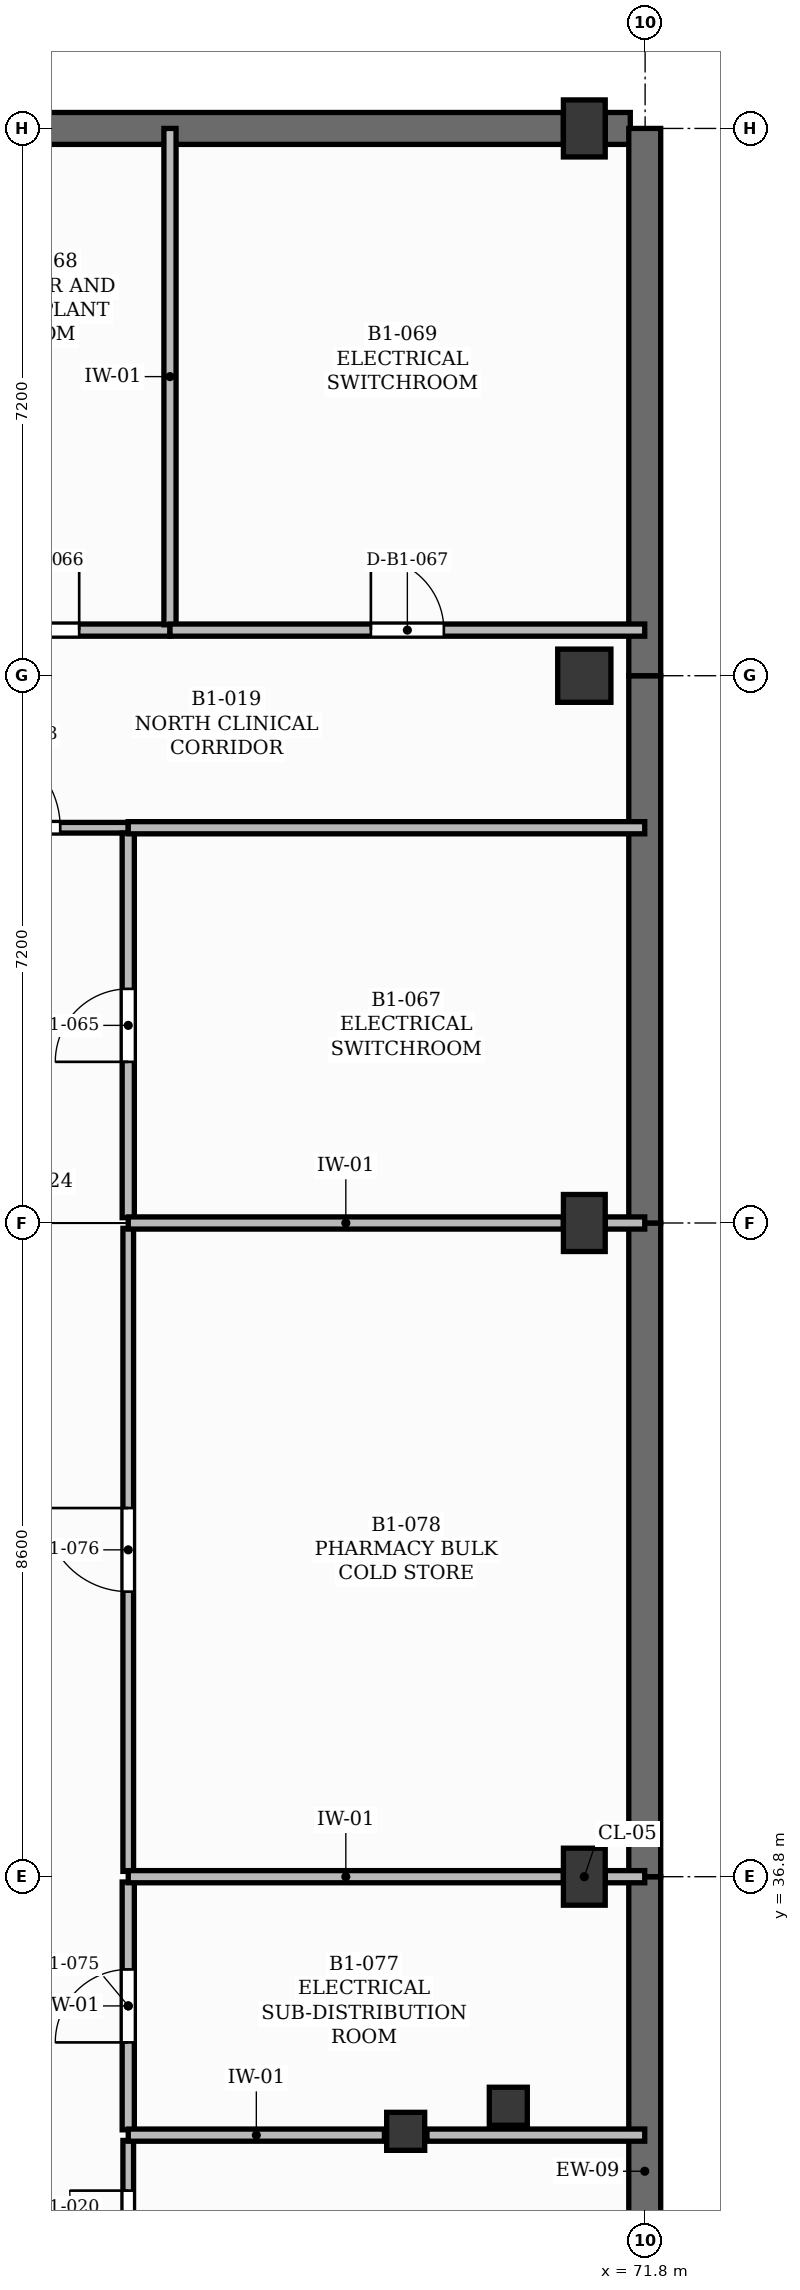
"""IFC4 building model, lengths in metres.
Left out: names, types, materials, properties, quantities, classifications, styles, units other than length and angle.
Written with IfcOpenShell. Run it as: python <this file> out.ifc"""

import sys

from ifc_helpers import new_model, si_unit, direction, frame, frame_2d, origin, origin_2d, place, context, subcontext, project, spatial, rectangle, extrude, element, fill, save


model = new_model("IFC4")
c1 = context("Model", 3, precision=1e-05, world=origin(), true_north=direction((0.0, 1.0)))
c2 = subcontext(c1, "Body", "Model", "MODEL_VIEW")
j1 = project(units=[si_unit("LENGTHUNIT", "METRE"), si_unit("PLANEANGLEUNIT", "RADIAN")], contexts=[c1])
p1 = place(None, origin())
s1 = spatial("IfcSite", under=j1, at=p1, CompositionType="ELEMENT")
p2 = place(p1, origin())
s2 = spatial("IfcBuilding", under=s1, at=p2, CompositionType="ELEMENT")
p3 = place(p2, frame((0.0, 0.0, -4.5)))
s3 = spatial("IfcBuildingStorey", under=s2, at=p3, CompositionType="ELEMENT", Elevation=-4.5)
for number, where, z_axis, x_axis in (
    (1, (71.0, 36.8, 0.0), (0.0, 0.0, 1.0), (1.0, 0.0, 0.0)),
    (2, (71.0, 45.4, 0.0), (0.0, 0.0, 1.0), (1.0, 0.0, 0.0)),
):
    element("IfcColumn", number, at=place(p3, frame(where, z_axis=z_axis, x_axis=x_axis)), inside=s3, PredefinedType="COLUMN", context=c2, shape_type="SweptSolid", body=[
        extrude(rectangle(XDim=0.55, YDim=0.75, at=origin_2d()), origin(), (0.0, 0.0, 1.0), 4.2),
    ])
p4 = place(p3, frame((71.0, 52.6, 0.0), z_axis=(0.0, 0.0, 1.0), x_axis=(1.0, 0.0, 0.0)))
e3 = element("IfcColumn", 3, at=p4, inside=s3, PredefinedType="COLUMN", context=c2, shape_type="SweptSolid", body=[
    extrude(rectangle(XDim=0.7, YDim=0.7, at=origin_2d()), origin(), (0.0, 0.0, 1.0), 4.2),
])
p5 = place(p3, frame((71.0, 59.8, 0.0), z_axis=(0.0, 0.0, 1.0), x_axis=(1.0, 0.0, 0.0)))
e4 = element("IfcColumn", 4, at=p5, inside=s3, PredefinedType="COLUMN", context=c2, shape_type="SweptSolid", body=[
    extrude(rectangle(XDim=0.55, YDim=0.75, at=origin_2d()), origin(), (0.0, 0.0, 1.0), 4.2),
])
p6 = place(p3, frame((71.795, 27.2, 0.0), z_axis=(0.0, 0.0, 1.0), x_axis=(0.0, 1.0, 0.0)))
e5 = element("IfcWall", 5, at=p6, inside=s3, PredefinedType="USERDEFINED", context=c2, shape_type="SweptSolid", body=[
    extrude(rectangle(XDim=9.6, YDim=0.42, at=frame_2d((4.8, 0.0))), origin(), (0.0, 0.0, 1.0), 4.2),
])
p7 = place(p3, frame((71.795, 36.8, 0.0), z_axis=(0.0, 0.0, 1.0), x_axis=(0.0, 1.0, 0.0)))
e6 = element("IfcWall", 6, at=p7, inside=s3, PredefinedType="USERDEFINED", context=c2, shape_type="SweptSolid", body=[
    extrude(rectangle(XDim=8.6, YDim=0.42, at=frame_2d((4.3, 0.0))), origin(), (0.0, 0.0, 1.0), 4.2),
])
p8 = place(p3, frame((71.795, 45.4, 0.0), z_axis=(0.0, 0.0, 1.0), x_axis=(0.0, 1.0, 0.0)))
e7 = element("IfcWall", 7, at=p8, inside=s3, PredefinedType="USERDEFINED", context=c2, shape_type="SweptSolid", body=[
    extrude(rectangle(XDim=7.2, YDim=0.42, at=frame_2d((3.6, 0.0))), origin(), (0.0, 0.0, 1.0), 4.2),
])
p9 = place(p3, frame((62.55, 59.8, 0.0), z_axis=(0.0, 0.0, 1.0), x_axis=(1.0, 0.0, 0.0)))
e8 = element("IfcWall", 8, at=p9, inside=s3, PredefinedType="USERDEFINED", context=c2, shape_type="SweptSolid", body=[
    extrude(rectangle(XDim=8.175, YDim=0.42, at=frame_2d((4.087, 0.0))), origin(), (0.0, 0.0, 1.0), 4.2),
])
p10 = place(p3, frame((71.275, 59.8, 0.0), z_axis=(0.0, 0.0, 1.0), x_axis=(1.0, 0.0, 0.0)))
e9 = element("IfcWall", 9, at=p10, inside=s3, PredefinedType="USERDEFINED", context=c2, shape_type="SweptSolid", body=[
    extrude(rectangle(XDim=0.33, YDim=0.42, at=frame_2d((0.165, 0.0))), origin(), (0.0, 0.0, 1.0), 4.2),
])
p11 = place(p3, frame((71.795, 52.6, 0.0), z_axis=(0.0, 0.0, 1.0), x_axis=(0.0, 1.0, 0.0)))
e10 = element("IfcWall", 10, at=p11, inside=s3, PredefinedType="USERDEFINED", context=c2, shape_type="SweptSolid", body=[
    extrude(rectangle(XDim=7.2, YDim=0.42, at=frame_2d((3.6, 0.0))), origin(), (0.0, 0.0, 1.0), 4.2),
])
for number, where, z_axis, x_axis in (
    (11, (70.0, 33.78, 0.0), (0.0, 0.0, 1.0), (1.0, 0.0, 0.0)),
    (12, (68.65, 33.45, 0.0), (0.0, 0.0, 1.0), (1.0, 0.0, 0.0)),
):
    element("IfcColumn", number, at=place(p3, frame(where, z_axis=z_axis, x_axis=x_axis)), inside=s3, PredefinedType="COLUMN", context=c2, shape_type="SweptSolid", body=[
        extrude(rectangle(XDim=0.5, YDim=0.5, at=origin_2d()), origin(), (0.0, 0.0, 1.0), 4.2),
    ])
p12 = place(p3, frame((62.05, 50.6, 0.0), z_axis=(0.0, 0.0, 1.0), x_axis=(1.0, 0.0, 0.0)))
e13 = element("IfcWall", 13, at=p12, inside=s3, PredefinedType="PARTITIONING", context=c2, shape_type="SweptSolid", body=[
    extrude(rectangle(XDim=2.95, YDim=0.14, at=frame_2d((1.475, 0.0))), origin(), (0.0, 0.0, 1.0), 4.08),
])
p13 = place(p12, frame((0.895, 0.0, 0.0)))
e14 = element("IfcOpeningElement", 14, at=p13, cuts=e13, PredefinedType="OPENING", context=c2, shape_type="SweptSolid", body=[
    extrude(rectangle(XDim=1.16, YDim=2.1, at=frame_2d((0.58, 1.05))), frame((0.0, 0.08, 0.0), z_axis=(0.0, -1.0, 0.0), x_axis=(1.0, 0.0, 0.0)), (0.0, 0.0, 1.0), 0.16),
])
p14 = place(p3, frame((62.2, 53.2, 0.0), z_axis=(0.0, 0.0, 1.0), x_axis=(1.0, 0.0, 0.0)))
e15 = element("IfcWall", 15, at=p14, inside=s3, PredefinedType="PARTITIONING", context=c2, shape_type="SweptSolid", body=[
    extrude(rectangle(XDim=3.349, YDim=0.16, at=frame_2d((1.675, 0.0))), origin(), (0.0, 0.0, 1.0), 4.08),
])
p15 = place(p14, frame((1.195, 0.0, 0.0)))
e16 = element("IfcOpeningElement", 16, at=p15, cuts=e15, PredefinedType="OPENING", context=c2, shape_type="SweptSolid", body=[
    extrude(rectangle(XDim=0.96, YDim=2.1, at=frame_2d((0.48, 1.05))), frame((0.0, 0.09, 0.0), z_axis=(0.0, -1.0, 0.0), x_axis=(1.0, 0.0, 0.0)), (0.0, 0.0, 1.0), 0.18),
])
p16 = place(p3, frame((65.0, 30.47, 0.0), z_axis=(0.0, 0.0, 1.0), x_axis=(0.0, 1.0, 0.0)))
e17 = element("IfcWall", 17, at=p16, inside=s3, PredefinedType="PARTITIONING", context=c2, shape_type="SweptSolid", body=[
    extrude(rectangle(XDim=2.86, YDim=0.14, at=frame_2d((1.43, 0.0))), origin(), (0.0, 0.0, 1.0), 4.08),
])
p17 = place(p16, frame((0.66, 0.0, 0.0)))
e18 = element("IfcOpeningElement", 18, at=p17, cuts=e17, PredefinedType="OPENING", context=c2, shape_type="SweptSolid", body=[
    extrude(rectangle(XDim=1.54, YDim=2.25, at=frame_2d((0.77, 1.125))), frame((0.0, 0.08, 0.0), z_axis=(0.0, -1.0, 0.0), x_axis=(1.0, 0.0, 0.0)), (0.0, 0.0, 1.0), 0.16),
])
p18 = place(p3, frame((65.0, 33.47, 0.0), z_axis=(0.0, 0.0, 1.0), x_axis=(0.0, 1.0, 0.0)))
e19 = element("IfcWall", 19, at=p18, inside=s3, PredefinedType="PARTITIONING", context=c2, shape_type="SweptSolid", body=[
    extrude(rectangle(XDim=3.26, YDim=0.16, at=frame_2d((1.63, 0.0))), origin(), (0.0, 0.0, 1.0), 4.08),
])
p19 = place(p18, frame((1.15, 0.0, 0.0)))
e20 = element("IfcOpeningElement", 20, at=p19, cuts=e19, PredefinedType="OPENING", context=c2, shape_type="SweptSolid", body=[
    extrude(rectangle(XDim=0.96, YDim=2.1, at=frame_2d((0.48, 1.05))), frame((0.0, 0.09, 0.0), z_axis=(0.0, -1.0, 0.0), x_axis=(1.0, 0.0, 0.0)), (0.0, 0.0, 1.0), 0.18),
])
p20 = place(p3, frame((65.0, 33.4, 0.0), z_axis=(0.0, 0.0, 1.0), x_axis=(1.0, 0.0, 0.0)))
e21 = element("IfcWall", 21, at=p20, inside=s3, PredefinedType="PARTITIONING", context=c2, shape_type="SweptSolid", body=[
    extrude(rectangle(XDim=3.37, YDim=0.16, at=frame_2d((1.685, 0.0))), origin(), (0.0, 0.0, 1.0), 4.08),
])
p21 = place(p3, frame((68.93, 33.4, 0.0), z_axis=(0.0, 0.0, 1.0), x_axis=(1.0, 0.0, 0.0)))
e22 = element("IfcWall", 22, at=p21, inside=s3, PredefinedType="PARTITIONING", context=c2, shape_type="SweptSolid", body=[
    extrude(rectangle(XDim=2.865, YDim=0.16, at=frame_2d((1.433, 0.0))), origin(), (0.0, 0.0, 1.0), 4.08),
])
p22 = place(p3, frame((65.0, 36.87, 0.0), z_axis=(0.0, 0.0, 1.0), x_axis=(0.0, 1.0, 0.0)))
e23 = element("IfcWall", 23, at=p22, inside=s3, PredefinedType="PARTITIONING", context=c2, shape_type="SweptSolid", body=[
    extrude(rectangle(XDim=8.46, YDim=0.14, at=frame_2d((4.23, 0.0))), origin(), (0.0, 0.0, 1.0), 4.08),
])
p23 = place(p22, frame((3.68, 0.0, 0.0)))
e24 = element("IfcOpeningElement", 24, at=p23, cuts=e23, PredefinedType="OPENING", context=c2, shape_type="SweptSolid", body=[
    extrude(rectangle(XDim=1.1, YDim=2.1, at=frame_2d((0.55, 1.05))), frame((0.0, 0.08, 0.0), z_axis=(0.0, -1.0, 0.0), x_axis=(1.0, 0.0, 0.0)), (0.0, 0.0, 1.0), 0.16),
])
p24 = place(p3, frame((65.0, 36.8, 0.0), z_axis=(0.0, 0.0, 1.0), x_axis=(1.0, 0.0, 0.0)))
e25 = element("IfcWall", 25, at=p24, inside=s3, PredefinedType="PARTITIONING", context=c2, shape_type="SweptSolid", body=[
    extrude(rectangle(XDim=5.725, YDim=0.16, at=frame_2d((2.863, 0.0))), origin(), (0.0, 0.0, 1.0), 3.4),
])
p25 = place(p3, frame((71.275, 36.8, 0.0), z_axis=(0.0, 0.0, 1.0), x_axis=(1.0, 0.0, 0.0)))
e26 = element("IfcWall", 26, at=p25, inside=s3, PredefinedType="PARTITIONING", context=c2, shape_type="SweptSolid", body=[
    extrude(rectangle(XDim=0.52, YDim=0.16, at=frame_2d((0.26, 0.0))), origin(), (0.0, 0.0, 1.0), 4.08),
])
p26 = place(p3, frame((65.0, 45.47, 0.0), z_axis=(0.0, 0.0, 1.0), x_axis=(0.0, 1.0, 0.0)))
e27 = element("IfcWall", 27, at=p26, inside=s3, PredefinedType="PARTITIONING", context=c2, shape_type="SweptSolid", body=[
    extrude(rectangle(XDim=5.06, YDim=0.16, at=frame_2d((2.53, 0.0))), origin(), (0.0, 0.0, 1.0), 4.08),
])
p27 = place(p26, frame((2.05, 0.0, 0.0)))
e28 = element("IfcOpeningElement", 28, at=p27, cuts=e27, PredefinedType="OPENING", context=c2, shape_type="SweptSolid", body=[
    extrude(rectangle(XDim=0.96, YDim=2.1, at=frame_2d((0.48, 1.05))), frame((0.0, 0.09, 0.0), z_axis=(0.0, -1.0, 0.0), x_axis=(1.0, 0.0, 0.0)), (0.0, 0.0, 1.0), 0.18),
])
p28 = place(p3, frame((65.0, 45.4, 0.0), z_axis=(0.0, 0.0, 1.0), x_axis=(1.0, 0.0, 0.0)))
e29 = element("IfcWall", 29, at=p28, inside=s3, PredefinedType="PARTITIONING", context=c2, shape_type="SweptSolid", body=[
    extrude(rectangle(XDim=5.725, YDim=0.16, at=frame_2d((2.863, 0.0))), origin(), (0.0, 0.0, 1.0), 3.4),
])
p29 = place(p3, frame((71.275, 45.4, 0.0), z_axis=(0.0, 0.0, 1.0), x_axis=(1.0, 0.0, 0.0)))
e30 = element("IfcWall", 30, at=p29, inside=s3, PredefinedType="PARTITIONING", context=c2, shape_type="SweptSolid", body=[
    extrude(rectangle(XDim=0.52, YDim=0.16, at=frame_2d((0.26, 0.0))), origin(), (0.0, 0.0, 1.0), 4.08),
])
p30 = place(p3, frame((65.0, 50.6, 0.0), z_axis=(0.0, 0.0, 1.0), x_axis=(1.0, 0.0, 0.0)))
e31 = element("IfcWall", 31, at=p30, inside=s3, PredefinedType="PARTITIONING", context=c2, shape_type="SweptSolid", body=[
    extrude(rectangle(XDim=6.795, YDim=0.16, at=frame_2d((3.397, 0.0))), origin(), (0.0, 0.0, 1.0), 4.08),
])
p31 = place(p3, frame((65.549, 53.27, 0.0), z_axis=(0.0, 0.0, 1.0), x_axis=(0.0, 1.0, 0.0)))
e32 = element("IfcWall", 32, at=p31, inside=s3, PredefinedType="PARTITIONING", context=c2, shape_type="SweptSolid", body=[
    extrude(rectangle(XDim=6.53, YDim=0.16, at=frame_2d((3.265, 0.0))), origin(), (0.0, 0.0, 1.0), 4.08),
])
p32 = place(p3, frame((65.549, 53.2, 0.0), z_axis=(0.0, 0.0, 1.0), x_axis=(1.0, 0.0, 0.0)))
e33 = element("IfcWall", 33, at=p32, inside=s3, PredefinedType="PARTITIONING", context=c2, shape_type="SweptSolid", body=[
    extrude(rectangle(XDim=6.246, YDim=0.16, at=frame_2d((3.123, 0.0))), origin(), (0.0, 0.0, 1.0), 4.08),
])
p33 = place(p32, frame((2.643, 0.0, 0.0)))
e34 = element("IfcOpeningElement", 34, at=p33, cuts=e33, PredefinedType="OPENING", context=c2, shape_type="SweptSolid", body=[
    extrude(rectangle(XDim=0.96, YDim=2.1, at=frame_2d((0.48, 1.05))), frame((0.0, 0.09, 0.0), z_axis=(0.0, -1.0, 0.0), x_axis=(1.0, 0.0, 0.0)), (0.0, 0.0, 1.0), 0.18),
])
p34 = place(p13, origin())
e35 = element("IfcDoor", 35, at=p34, inside=s3, OperationType="SINGLE_SWING_LEFT", PredefinedType="DOOR", context=c2, shape_type="SweptSolid", body=[
    extrude(rectangle(XDim=1.16, YDim=2.1, at=frame_2d((0.58, 1.05))), frame((0.0, 0.025, 0.0), z_axis=(0.0, -1.0, 0.0), x_axis=(1.0, 0.0, 0.0)), (0.0, 0.0, 1.0), 0.05),
])
fill(e14, e35)
p35 = place(p17, origin())
e36 = element("IfcDoor", 36, at=p35, inside=s3, OperationType="DOUBLE_DOOR_SINGLE_SWING", PredefinedType="DOOR", context=c2, shape_type="SweptSolid", body=[
    extrude(rectangle(XDim=1.54, YDim=2.25, at=frame_2d((0.77, 1.125))), frame((0.0, 0.025, 0.0), z_axis=(0.0, -1.0, 0.0), x_axis=(1.0, 0.0, 0.0)), (0.0, 0.0, 1.0), 0.05),
])
fill(e18, e36)
p36 = place(p27, origin())
e37 = element("IfcDoor", 37, at=p36, inside=s3, OperationType="SINGLE_SWING_LEFT", PredefinedType="DOOR", context=c2, shape_type="SweptSolid", body=[
    extrude(rectangle(XDim=0.96, YDim=2.1, at=frame_2d((0.48, 1.05))), frame((0.0, 0.025, 0.0), z_axis=(0.0, -1.0, 0.0), x_axis=(1.0, 0.0, 0.0)), (0.0, 0.0, 1.0), 0.05),
])
fill(e28, e37)
p37 = place(p15, origin())
e38 = element("IfcDoor", 38, at=p37, inside=s3, OperationType="SINGLE_SWING_RIGHT", PredefinedType="DOOR", context=c2, shape_type="SweptSolid", body=[
    extrude(rectangle(XDim=0.96, YDim=2.1, at=frame_2d((0.48, 1.05))), frame((0.0, 0.025, 0.0), z_axis=(0.0, -1.0, 0.0), x_axis=(1.0, 0.0, 0.0)), (0.0, 0.0, 1.0), 0.05),
])
fill(e16, e38)
p38 = place(p33, origin())
e39 = element("IfcDoor", 39, at=p38, inside=s3, OperationType="SINGLE_SWING_LEFT", PredefinedType="DOOR", context=c2, shape_type="SweptSolid", body=[
    extrude(rectangle(XDim=0.96, YDim=2.1, at=frame_2d((0.48, 1.05))), frame((0.0, 0.025, 0.0), z_axis=(0.0, -1.0, 0.0), x_axis=(1.0, 0.0, 0.0)), (0.0, 0.0, 1.0), 0.05),
])
fill(e34, e39)
p39 = place(p19, origin())
e40 = element("IfcDoor", 40, at=p39, inside=s3, OperationType="SINGLE_SWING_LEFT", PredefinedType="DOOR", context=c2, shape_type="SweptSolid", body=[
    extrude(rectangle(XDim=0.96, YDim=2.1, at=frame_2d((0.48, 1.05))), frame((0.0, 0.025, 0.0), z_axis=(0.0, -1.0, 0.0), x_axis=(1.0, 0.0, 0.0)), (0.0, 0.0, 1.0), 0.05),
])
fill(e20, e40)
p40 = place(p23, origin())
e41 = element("IfcDoor", 41, at=p40, inside=s3, OperationType="SINGLE_SWING_RIGHT", PredefinedType="DOOR", context=c2, shape_type="SweptSolid", body=[
    extrude(rectangle(XDim=1.1, YDim=2.1, at=frame_2d((0.55, 1.05))), frame((0.0, 0.025, 0.0), z_axis=(0.0, -1.0, 0.0), x_axis=(1.0, 0.0, 0.0)), (0.0, 0.0, 1.0), 0.05),
])
fill(e24, e41)
save(model, sys.argv[1])
